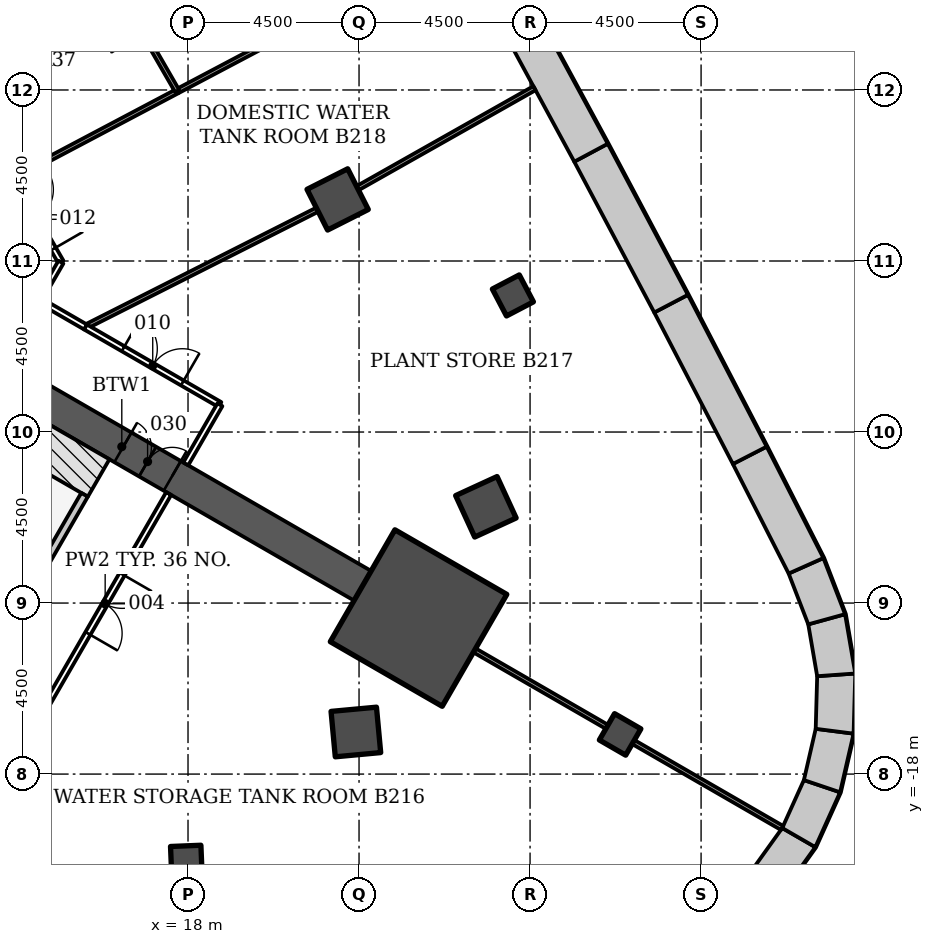
"""IFC4 building model, lengths in metres.
Left out: names, types, materials, properties, quantities, classifications, styles, units other than length and angle.
Written with IfcOpenShell. Run it as: python <this file> out.ifc"""

import sys

from ifc_helpers import new_model, si_unit, direction, frame, frame_2d, origin, origin_2d, place, context, subcontext, project, spatial, polyline, rectangle, outline, extrude, element, fill, save


model = new_model("IFC4")
c1 = context("Model", 3, precision=1e-05, world=origin(), true_north=direction((0.0, 1.0)))
c2 = subcontext(c1, "Body", "Model", "MODEL_VIEW")
j1 = project(units=[si_unit("LENGTHUNIT", "METRE"), si_unit("PLANEANGLEUNIT", "RADIAN")], contexts=[c1])
p1 = place(None, origin())
s1 = spatial("IfcSite", under=j1, at=p1, CompositionType="ELEMENT")
p2 = place(p1, origin())
s2 = spatial("IfcBuilding", under=s1, at=p2, CompositionType="ELEMENT")
p3 = place(p2, frame((0.0, 0.0, -9.0)))
s3 = spatial("IfcBuildingStorey", under=s2, at=p3, CompositionType="ELEMENT", Elevation=-9.0)
p4 = place(p3, origin())
e1 = element("IfcWall", 1, at=p4, inside=s3, PredefinedType="SOLIDWALL", context=c2, shape_type="SweptSolid", body=[
    extrude(outline(polyline([(33.582, -21.208), (34.506, -19.922), (33.635, -19.419), (32.828, -20.544), (33.582, -21.208)])), origin(), (0.0, 0.0, 1.0), 4.2),
])
p5 = place(p3, origin())
e2 = element("IfcWall", 2, at=p5, inside=s3, PredefinedType="SOLIDWALL", context=c2, shape_type="SweptSolid", body=[
    extrude(outline(polyline([(34.506, -19.922), (35.158, -18.479), (34.205, -18.158), (33.635, -19.419), (34.506, -19.922)])), origin(), (0.0, 0.0, 1.0), 4.2),
])
p6 = place(p3, origin())
e3 = element("IfcWall", 3, at=p6, inside=s3, PredefinedType="SOLIDWALL", context=c2, shape_type="SweptSolid", body=[
    extrude(outline(polyline([(35.158, -18.479), (35.513, -16.936), (34.516, -16.809), (34.205, -18.158), (35.158, -18.479)])), origin(), (0.0, 0.0, 1.0), 4.2),
])
p7 = place(p3, origin())
e4 = element("IfcWall", 4, at=p7, inside=s3, PredefinedType="SOLIDWALL", context=c2, shape_type="SweptSolid", body=[
    extrude(outline(polyline([(35.513, -16.936), (35.557, -15.353), (34.555, -15.425), (34.516, -16.809), (35.513, -16.936)])), origin(), (0.0, 0.0, 1.0), 4.2),
])
p8 = place(p3, origin())
e5 = element("IfcWall", 5, at=p8, inside=s3, PredefinedType="SOLIDWALL", context=c2, shape_type="SweptSolid", body=[
    extrude(outline(polyline([(35.557, -15.353), (35.289, -13.793), (34.32, -14.06), (34.555, -15.425), (35.557, -15.353)])), origin(), (0.0, 0.0, 1.0), 4.2),
])
p9 = place(p3, origin())
e6 = element("IfcWall", 6, at=p9, inside=s3, PredefinedType="SOLIDWALL", context=c2, shape_type="SweptSolid", body=[
    extrude(outline(polyline([(35.289, -13.793), (34.719, -12.316), (33.804, -12.724), (34.32, -14.06), (35.289, -13.793)])), origin(), (0.0, 0.0, 1.0), 4.2),
])
p10 = place(p3, origin())
e7 = element("IfcWall", 7, at=p10, inside=s3, PredefinedType="SOLIDWALL", context=c2, shape_type="SweptSolid", body=[
    extrude(outline(polyline([(34.719, -12.316), (33.226, -9.384), (32.337, -9.841), (33.804, -12.724), (34.719, -12.316)])), origin(), (0.0, 0.0, 1.0), 4.2),
])
p11 = place(p3, origin())
e8 = element("IfcWall", 8, at=p11, inside=s3, PredefinedType="SOLIDWALL", context=c2, shape_type="SweptSolid", body=[
    extrude(outline(polyline([(33.226, -9.384), (31.153, -5.39), (30.268, -5.854), (32.337, -9.841), (33.226, -9.384)])), origin(), (0.0, 0.0, 1.0), 4.2),
])
p12 = place(p3, origin())
e9 = element("IfcWall", 9, at=p12, inside=s3, PredefinedType="SOLIDWALL", context=c2, shape_type="SweptSolid", body=[
    extrude(outline(polyline([(31.153, -5.39), (29.045, -1.415), (28.164, -1.887), (30.268, -5.854), (31.153, -5.39)])), origin(), (0.0, 0.0, 1.0), 4.2),
])
p13 = place(p3, origin())
e10 = element("IfcWall", 10, at=p13, inside=s3, PredefinedType="SOLIDWALL", context=c2, shape_type="SweptSolid", body=[
    extrude(outline(polyline([(29.045, -1.415), (26.901, 2.542), (26.024, 2.062), (28.164, -1.887), (29.045, -1.415)])), origin(), (0.0, 0.0, 1.0), 4.2),
])
for number, where, z_axis, x_axis in (
    (11, (22.417, -16.893, -0.3), (0.0, 0.0, 1.0), (0.093, -0.996, 0.0)),
    (12, (25.838, -10.967, -0.3), (0.0, 0.0, 1.0), (0.909, 0.418, 0.0)),
    (13, (21.937, -2.88, -0.3), (0.0, 0.0, 1.0), (0.893, 0.451, 0.0)),
):
    element("IfcColumn", number, at=place(p3, frame(where, z_axis=z_axis, x_axis=x_axis)), inside=s3, PredefinedType="COLUMN", context=c2, shape_type="SweptSolid", body=[
        extrude(rectangle(XDim=1.2, YDim=1.2, at=origin_2d()), origin(), (0.0, 0.0, 1.0), 4.5),
    ])
for number, where, z_axis, x_axis in (
    (14, (17.956, -20.288, -0.3), (0.0, 0.0, 1.0), (0.041, -0.999, 0.0)),
    (15, (29.37, -16.957, -0.3), (0.0, 0.0, 1.0), (0.866, -0.5, 0.0)),
    (16, (26.548, -5.406, -0.3), (0.0, 0.0, 1.0), (0.886, 0.464, 0.0)),
):
    element("IfcColumn", number, at=place(p3, frame(where, z_axis=z_axis, x_axis=x_axis)), inside=s3, PredefinedType="COLUMN", context=c2, shape_type="SweptSolid", body=[
        extrude(rectangle(XDim=0.8, YDim=0.8, at=origin_2d()), origin(), (0.0, 0.0, 1.0), 4.5),
    ])
p14 = place(p3, frame((9.922, -5.728, -0.3), z_axis=(0.0, 0.0, 1.0), x_axis=(0.866028046028, -0.499995423472, 0.0)))
e17 = element("IfcWall", 17, at=p14, inside=s3, PredefinedType="SHEAR", context=c2, shape_type="SweptSolid", body=[
    extrude(rectangle(XDim=14.633, YDim=0.9, at=frame_2d((7.316, 0.0))), origin(), (0.0, 0.0, 1.0), 4.5),
])
p15 = place(p14, frame((7.35, 0.0, 0.3)))
e18 = element("IfcOpeningElement", 18, at=p15, cuts=e17, PredefinedType="OPENING", context=c2, shape_type="SweptSolid", body=[
    extrude(rectangle(XDim=1.5, YDim=2.1, at=frame_2d((0.75, 1.05))), frame((0.0, 0.46, 0.0), z_axis=(0.0, -1.0, 0.0), x_axis=(1.0, 0.0, 0.0)), (0.0, 0.0, 1.0), 0.92),
])
p16 = place(p3, frame((24.066, -13.895, -0.3), z_axis=(0.0, 0.0, 1.0), x_axis=(0.866025403784, -0.5, 0.0)))
e19 = element("IfcColumn", 19, at=p16, inside=s3, PredefinedType="COLUMN", context=c2, shape_type="SweptSolid", body=[
    extrude(rectangle(XDim=3.4, YDim=3.4, at=origin_2d()), origin(), (0.0, 0.0, 1.0), 4.5),
])
p17 = place(p3, frame((9.413, -6.61, -0.3), z_axis=(0.0, 0.0, 1.0), x_axis=(0.866018442252, -0.500012057535, 0.0)))
e20 = element("IfcWall", 20, at=p17, inside=s3, PredefinedType="SHEAR", context=c2, shape_type="SweptSolid", body=[
    extrude(rectangle(XDim=7.2, YDim=1.136, at=frame_2d((3.6, 0.0))), origin(), (0.0, 0.0, 1.0), 4.5),
])
p18 = place(p3, frame((0.0, 0.0, -0.3)))
e21 = element("IfcWall", 21, at=p18, inside=s3, PredefinedType="SHEAR", context=c2, shape_type="SweptSolid", body=[
    extrude(outline(polyline([(12.104, -13.149), (14.289, -12.563), (15.364, -10.701), (15.191, -10.601), (14.157, -12.392), (12.132, -12.934), (12.204, -12.976), (12.204, -12.976), (12.204, -12.976), (12.204, -12.976), (12.204, -12.976), (12.204, -12.976), (12.204, -12.976), (12.204, -12.976), (12.204, -12.976), (12.204, -12.976), (12.204, -12.976), (12.204, -12.976), (12.204, -12.976), (12.204, -12.976), (12.204, -12.976), (12.204, -12.976), (12.204, -12.976), (12.104, -13.149)])), origin(), (0.0, 0.0, 1.0), 4.5),
])
p19 = place(p3, frame((17.491, -10.618, 0.0), z_axis=(0.0, 0.0, 1.0), x_axis=(-0.499969057507, -0.866043267704, 0.0)))
e22 = element("IfcWall", 22, at=p19, inside=s3, PredefinedType="PARTITIONING", context=c2, shape_type="SweptSolid", body=[
    extrude(rectangle(XDim=6.685, YDim=0.15, at=frame_2d((3.342, 0.0))), origin(), (0.0, 0.0, 1.0), 3.588),
])
p20 = place(p19, frame((2.45, 0.0, 0.0)))
e23 = element("IfcOpeningElement", 23, at=p20, cuts=e22, PredefinedType="OPENING", context=c2, shape_type="SweptSolid", body=[
    extrude(rectangle(XDim=1.8, YDim=2.1, at=frame_2d((0.9, 1.05))), frame((0.0, 0.085, 0.0), z_axis=(0.0, -1.0, 0.0), x_axis=(1.0, 0.0, 0.0)), (0.0, 0.0, 1.0), 0.17),
])
p21 = place(p3, frame((29.023, -16.757, 0.0), z_axis=(0.0, 0.0, 1.0), x_axis=(-0.866027971625, 0.499995552344, 0.0)))
e24 = element("IfcWall", 24, at=p21, inside=s3, PredefinedType="PARTITIONING", context=c2, shape_type="SweptSolid", body=[
    extrude(rectangle(XDim=4.024, YDim=0.12, at=frame_2d((2.012, 0.0))), origin(), (0.0, 0.0, 1.0), 3.667),
])
p22 = place(p3, frame((33.634, -19.419, 0.0), z_axis=(0.0, 0.0, 1.0), x_axis=(-0.866032814021, 0.499987164874, 0.0)))
e25 = element("IfcWall", 25, at=p22, inside=s3, PredefinedType="PARTITIONING", context=c2, shape_type="SweptSolid", body=[
    extrude(rectangle(XDim=4.524, YDim=0.12, at=frame_2d((2.262, 0.0))), origin(), (0.0, 0.0, 1.0), 4.2),
])
p23 = place(p3, frame((21.401, -3.15, 0.0), z_axis=(0.0, 0.0, 1.0), x_axis=(-0.892483368892, -0.451080299117, 0.0)))
e26 = element("IfcWall", 26, at=p23, inside=s3, PredefinedType="PARTITIONING", context=c2, shape_type="SweptSolid", body=[
    extrude(rectangle(XDim=6.837, YDim=0.12, at=frame_2d((3.418, 0.0))), origin(), (0.0, 0.0, 1.0), 3.588),
])
p24 = place(p3, frame((27.116, 0.047, 0.0), z_axis=(0.0, 0.0, 1.0), x_axis=(-0.87056283872, -0.492057256668, 0.0)))
e27 = element("IfcWall", 27, at=p24, inside=s3, PredefinedType="PARTITIONING", context=c2, shape_type="SweptSolid", body=[
    extrude(rectangle(XDim=5.347, YDim=0.12, at=frame_2d((2.674, 0.0))), origin(), (0.0, 0.0, 1.0), 3.583),
])
p25 = place(p3, frame((15.296, -6.233, 0.0), z_axis=(0.0, 0.0, 1.0), x_axis=(0.866035577775, -0.499982377718, 0.0)))
e28 = element("IfcWall", 28, at=p25, inside=s3, PredefinedType="PARTITIONING", context=c2, shape_type="SweptSolid", body=[
    extrude(rectangle(XDim=4.093, YDim=0.15, at=frame_2d((2.046, 0.0))), origin(), (0.0, 0.0, 1.0), 3.588),
])
p26 = place(p25, frame((1.15, 0.0, 0.0)))
e29 = element("IfcOpeningElement", 29, at=p26, cuts=e28, PredefinedType="OPENING", context=c2, shape_type="SweptSolid", body=[
    extrude(rectangle(XDim=1.8, YDim=2.1, at=frame_2d((0.9, 1.05))), frame((0.0, 0.085, 0.0), z_axis=(0.0, -1.0, 0.0), x_axis=(1.0, 0.0, 0.0)), (0.0, 0.0, 1.0), 0.17),
])
p27 = place(p3, frame((18.84, -8.281, 0.0), z_axis=(0.0, 0.0, 1.0), x_axis=(-0.500126010714, -0.86595263924, 0.0)))
e30 = element("IfcWall", 30, at=p27, inside=s3, PredefinedType="PARTITIONING", context=c2, shape_type="SweptSolid", body=[
    extrude(rectangle(XDim=1.798, YDim=0.15, at=frame_2d((0.899, 0.0))), origin(), (0.0, 0.0, 1.0), 3.588),
])
p28 = place(p3, frame((17.717, -0.033, 0.0), z_axis=(0.0, 0.0, 1.0), x_axis=(-0.884034960309, -0.467420783611, 0.0)))
e31 = element("IfcWall", 31, at=p28, inside=s3, PredefinedType="PARTITIONING", context=c2, shape_type="SweptSolid", body=[
    extrude(rectangle(XDim=4.901, YDim=0.12, at=frame_2d((2.451, 0.0))), origin(), (0.0, 0.0, 1.0), 3.588),
])
p29 = place(p3, frame((13.382, -2.321, 0.0), z_axis=(0.0, 0.0, 1.0), x_axis=(0.500076401611, -0.8659812888, 0.0)))
e32 = element("IfcWall", 32, at=p29, inside=s3, PredefinedType="PARTITIONING", context=c2, shape_type="SweptSolid", body=[
    extrude(rectangle(XDim=2.547, YDim=0.15, at=frame_2d((1.274, 0.0))), origin(), (0.0, 0.0, 1.0), 3.588),
])
p30 = place(p29, frame((0.35, 0.0, 0.0)))
e33 = element("IfcOpeningElement", 33, at=p30, cuts=e32, PredefinedType="OPENING", context=c2, shape_type="SweptSolid", body=[
    extrude(rectangle(XDim=1.8, YDim=2.1, at=frame_2d((0.9, 1.05))), frame((0.0, 0.085, 0.0), z_axis=(0.0, -1.0, 0.0), x_axis=(1.0, 0.0, 0.0)), (0.0, 0.0, 1.0), 0.17),
])
p31 = place(p3, frame((14.656, -4.529, 0.0), z_axis=(0.0, 0.0, 1.0), x_axis=(-0.500502949238, -0.865734831114, 0.0)))
e34 = element("IfcWall", 34, at=p31, inside=s3, PredefinedType="PARTITIONING", context=c2, shape_type="SweptSolid", body=[
    extrude(rectangle(XDim=1.155, YDim=0.15, at=frame_2d((0.578, 0.0))), origin(), (0.0, 0.0, 1.0), 4.2),
])
p32 = place(p3, frame((14.078, -5.529, 0.0), z_axis=(0.0, 0.0, 1.0), x_axis=(0.866110865696, -0.499851946404, 0.0)))
e35 = element("IfcWall", 35, at=p32, inside=s3, PredefinedType="PARTITIONING", context=c2, shape_type="SweptSolid", body=[
    extrude(rectangle(XDim=1.415, YDim=0.15, at=frame_2d((0.707, 0.0))), origin(), (0.0, 0.0, 1.0), 3.588),
])
p33 = place(p3, frame((19.875, 1.108, 0.0), z_axis=(0.0, 0.0, 1.0), x_axis=(-0.884133328187, -0.467234692621, 0.0)))
e36 = element("IfcWall", 36, at=p33, inside=s3, PredefinedType="PARTITIONING", context=c2, shape_type="SweptSolid", body=[
    extrude(rectangle(XDim=2.44, YDim=0.12, at=frame_2d((1.22, 0.0))), origin(), (0.0, 0.0, 1.0), 3.588),
])
p34 = place(p3, frame((17.717, -0.032, 0.0), z_axis=(0.0, 0.0, 1.0), x_axis=(-0.499892115999, 0.866087681682, 0.0)))
e37 = element("IfcWall", 37, at=p34, inside=s3, PredefinedType="PARTITIONING", context=c2, shape_type="SweptSolid", body=[
    extrude(rectangle(XDim=4.443, YDim=0.12, at=frame_2d((2.221, 0.0))), origin(), (0.0, 0.0, 1.0), 3.588),
])
p35 = place(p34, frame((1.75, 0.0, 0.0)))
e38 = element("IfcOpeningElement", 38, at=p35, cuts=e37, PredefinedType="OPENING", context=c2, shape_type="SweptSolid", body=[
    extrude(rectangle(XDim=1.0, YDim=2.1, at=frame_2d((0.5, 1.05))), frame((0.0, 0.07, 0.0), z_axis=(0.0, -1.0, 0.0), x_axis=(1.0, 0.0, 0.0)), (0.0, 0.0, 1.0), 0.14),
])
p36 = place(p20, origin())
e39 = element("IfcDoor", 39, at=p36, inside=s3, OperationType="DOUBLE_DOOR_SINGLE_SWING", PredefinedType="DOOR", context=c2, shape_type="SweptSolid", body=[
    extrude(rectangle(XDim=1.8, YDim=2.1, at=frame_2d((0.9, 1.05))), frame((0.0, 0.025, 0.0), z_axis=(0.0, -1.0, 0.0), x_axis=(1.0, 0.0, 0.0)), (0.0, 0.0, 1.0), 0.05),
])
fill(e23, e39)
p37 = place(p26, origin())
e40 = element("IfcDoor", 40, at=p37, inside=s3, OperationType="DOUBLE_DOOR_SINGLE_SWING", PredefinedType="DOOR", context=c2, shape_type="SweptSolid", body=[
    extrude(rectangle(XDim=1.8, YDim=2.1, at=frame_2d((0.9, 1.05))), frame((0.0, 0.025, 0.0), z_axis=(0.0, -1.0, 0.0), x_axis=(1.0, 0.0, 0.0)), (0.0, 0.0, 1.0), 0.05),
])
fill(e29, e40)
p38 = place(p30, origin())
e41 = element("IfcDoor", 41, at=p38, inside=s3, OperationType="DOUBLE_DOOR_SINGLE_SWING", PredefinedType="DOOR", context=c2, shape_type="SweptSolid", body=[
    extrude(rectangle(XDim=1.8, YDim=2.1, at=frame_2d((0.9, 1.05))), frame((0.0, 0.025, 0.0), z_axis=(0.0, -1.0, 0.0), x_axis=(1.0, 0.0, 0.0)), (0.0, 0.0, 1.0), 0.05),
])
fill(e33, e41)
p39 = place(p15, origin())
e42 = element("IfcDoor", 42, at=p39, inside=s3, OperationType="DOUBLE_DOOR_SINGLE_SWING", PredefinedType="DOOR", context=c2, shape_type="SweptSolid", body=[
    extrude(rectangle(XDim=1.5, YDim=2.1, at=frame_2d((0.75, 1.05))), frame((0.0, 0.025, 0.0), z_axis=(0.0, -1.0, 0.0), x_axis=(1.0, 0.0, 0.0)), (0.0, 0.0, 1.0), 0.05),
])
fill(e18, e42)
save(model, sys.argv[1])
